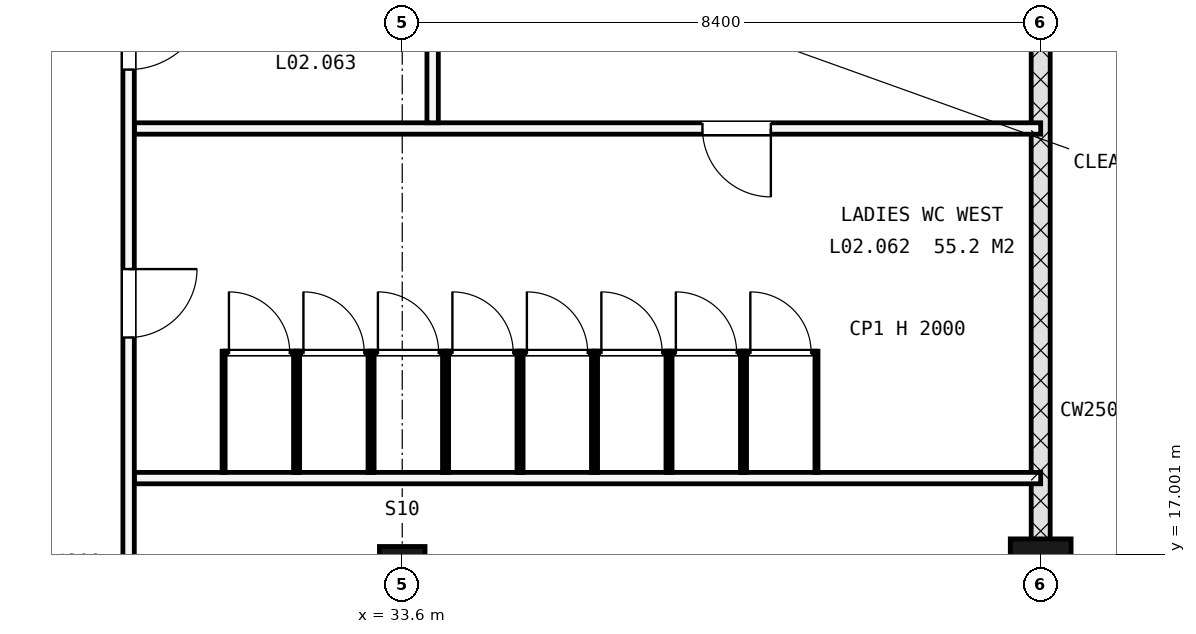
"""IFC4 building model, lengths in metres.
Left out: names, types, materials, properties, quantities, classifications, styles, units other than length and angle.
Written with IfcOpenShell. Run it as: python <this file> out.ifc"""

import sys

from ifc_helpers import new_model, si_unit, direction, frame, frame_2d, origin, origin_2d, place, context, subcontext, project, spatial, rectangle, extrude, element, fill, save


model = new_model("IFC4")
c1 = context("Model", 3, precision=1e-05, world=origin(), true_north=direction((0.0, 1.0)))
c2 = subcontext(c1, "Body", "Model", "MODEL_VIEW")
j1 = project(units=[si_unit("LENGTHUNIT", "METRE"), si_unit("PLANEANGLEUNIT", "RADIAN")], contexts=[c1])
p1 = place(None, origin())
s1 = spatial("IfcSite", under=j1, at=p1, CompositionType="ELEMENT")
p2 = place(p1, origin())
s2 = spatial("IfcBuilding", under=s1, at=p2, CompositionType="ELEMENT")
p3 = place(p2, frame((0.0, 0.0, 9.9)))
s3 = spatial("IfcBuildingStorey", under=s2, at=p3, CompositionType="ELEMENT", Elevation=9.9)
p4 = place(p3, frame((33.6, 16.8, -0.25), z_axis=(0.0, 0.0, 1.0), x_axis=(1.0, 0.0, 0.0)))
e1 = element("IfcColumn", 1, at=p4, inside=s3, PredefinedType="COLUMN", context=c2, shape_type="SweptSolid", body=[
    extrude(rectangle(XDim=0.6, YDim=0.6, at=origin_2d()), origin(), (0.0, 0.0, 1.0), 4.45),
])
p5 = place(p3, frame((42.0, 16.8, -0.25), z_axis=(0.0, 0.0, 1.0), x_axis=(1.0, 0.0, 0.0)))
e2 = element("IfcColumn", 2, at=p5, inside=s3, PredefinedType="COLUMN", context=c2, shape_type="SweptSolid", body=[
    extrude(rectangle(XDim=0.8, YDim=0.8, at=origin_2d()), origin(), (0.0, 0.0, 1.0), 4.45),
])
p6 = place(p3, frame((42.0, 12.675, -0.3), z_axis=(0.0, 0.0, 1.0), x_axis=(0.0, 1.0, 0.0)))
e3 = element("IfcWall", 3, at=p6, inside=s3, PredefinedType="SOLIDWALL", context=c2, shape_type="SweptSolid", body=[
    extrude(rectangle(XDim=12.425, YDim=0.25, at=frame_2d((6.212, 0.0))), origin(), (0.0, 0.0, 1.0), 4.5),
])
p7 = place(p3, frame((30.075, 18.0, 0.0), z_axis=(0.0, 0.0, 1.0), x_axis=(1.0, 0.0, 0.0)))
e4 = element("IfcWall", 4, at=p7, inside=s3, PredefinedType="PARTITIONING", context=c2, shape_type="SweptSolid", body=[
    extrude(rectangle(XDim=11.925, YDim=0.15, at=frame_2d((5.962, 0.0))), origin(), (0.0, 0.0, 1.0), 4.2),
])
p8 = place(p3, frame((30.075, 22.6, 0.0), z_axis=(0.0, 0.0, 1.0), x_axis=(1.0, 0.0, 0.0)))
e5 = element("IfcWall", 5, at=p8, inside=s3, PredefinedType="PARTITIONING", context=c2, shape_type="SweptSolid", body=[
    extrude(rectangle(XDim=11.925, YDim=0.15, at=frame_2d((5.962, 0.0))), origin(), (0.0, 0.0, 1.0), 4.2),
])
p9 = place(p8, frame((7.475, 0.0, 0.0)))
e6 = element("IfcOpeningElement", 6, at=p9, cuts=e5, PredefinedType="OPENING", context=c2, shape_type="SweptSolid", body=[
    extrude(rectangle(XDim=0.9, YDim=2.1, at=frame_2d((0.45, 1.05))), frame((0.0, 0.085, 0.0), z_axis=(0.0, -1.0, 0.0), x_axis=(1.0, 0.0, 0.0)), (0.0, 0.0, 1.0), 0.17),
])
p10 = place(p3, frame((30.0, 13.275, 0.0), z_axis=(0.0, 0.0, 1.0), x_axis=(0.0, 1.0, 0.0)))
e7 = element("IfcWall", 7, at=p10, inside=s3, PredefinedType="PARTITIONING", context=c2, shape_type="SweptSolid", body=[
    extrude(rectangle(XDim=11.825, YDim=0.15, at=frame_2d((5.913, 0.0))), origin(), (0.0, 0.0, 1.0), 4.2),
])
p11 = place(p10, frame((1.875, 0.0, 0.0)))
e8 = element("IfcOpeningElement", 8, at=p11, cuts=e7, PredefinedType="OPENING", context=c2, shape_type="SweptSolid", body=[
    extrude(rectangle(XDim=0.9, YDim=2.1, at=frame_2d((0.45, 1.05))), frame((0.0, 0.085, 0.0), z_axis=(0.0, -1.0, 0.0), x_axis=(1.0, 0.0, 0.0)), (0.0, 0.0, 1.0), 0.17),
])
p12 = place(p10, frame((6.575, 0.0, 0.0)))
e9 = element("IfcOpeningElement", 9, at=p12, cuts=e7, PredefinedType="OPENING", context=c2, shape_type="SweptSolid", body=[
    extrude(rectangle(XDim=0.9, YDim=2.1, at=frame_2d((0.45, 1.05))), frame((0.0, 0.085, 0.0), z_axis=(0.0, -1.0, 0.0), x_axis=(1.0, 0.0, 0.0)), (0.0, 0.0, 1.0), 0.17),
])
p13 = place(p10, frame((10.1, 0.0, 0.0)))
e10 = element("IfcOpeningElement", 10, at=p13, cuts=e7, PredefinedType="OPENING", context=c2, shape_type="SweptSolid", body=[
    extrude(rectangle(XDim=1.05, YDim=2.25, at=frame_2d((0.525, 1.125))), frame((0.0, 0.085, 0.0), z_axis=(0.0, -1.0, 0.0), x_axis=(1.0, 0.0, 0.0)), (0.0, 0.0, 1.0), 0.17),
])
p14 = place(p3, frame((34.0, 22.675, 0.0), z_axis=(0.0, 0.0, 1.0), x_axis=(0.0, 1.0, 0.0)))
e11 = element("IfcWall", 11, at=p14, inside=s3, PredefinedType="PARTITIONING", context=c2, shape_type="SweptSolid", body=[
    extrude(rectangle(XDim=2.425, YDim=0.15, at=frame_2d((1.212, 0.0))), origin(), (0.0, 0.0, 1.0), 4.2),
])
for number, where, z_axis, x_axis in (
    (12, (31.25, 18.075, 0.0), (0.0, 0.0, 1.0), (0.0, 1.0, 0.0)),
    (13, (32.19, 18.075, 0.0), (0.0, 0.0, 1.0), (0.0, 1.0, 0.0)),
):
    element("IfcWall", number, at=place(p3, frame(where, z_axis=z_axis, x_axis=x_axis)), inside=s3, PredefinedType="PARTITIONING", context=c2, shape_type="SweptSolid", body=[
        extrude(rectangle(XDim=1.595, YDim=0.04, at=frame_2d((0.797, 0.0))), origin(), (0.0, 0.0, 1.0), 2.0),
    ])
p15 = place(p3, frame((31.27, 19.65, 0.0), z_axis=(0.0, 0.0, 1.0), x_axis=(1.0, 0.0, 0.0)))
e14 = element("IfcWall", 14, at=p15, inside=s3, PredefinedType="PARTITIONING", context=c2, shape_type="SweptSolid", body=[
    extrude(rectangle(XDim=0.9, YDim=0.04, at=frame_2d((0.45, 0.0))), origin(), (0.0, 0.0, 1.0), 2.0),
])
p16 = place(p15, frame((0.05, 0.0, 0.0)))
e15 = element("IfcOpeningElement", 15, at=p16, cuts=e14, PredefinedType="OPENING", context=c2, shape_type="SweptSolid", body=[
    extrude(rectangle(XDim=0.8, YDim=2.0, at=frame_2d((0.4, 1.0))), frame((0.0, 0.03, 0.0), z_axis=(0.0, -1.0, 0.0), x_axis=(1.0, 0.0, 0.0)), (0.0, 0.0, 1.0), 0.06),
])
for number, where, z_axis, x_axis in (
    (16, (32.23, 18.075, 0.0), (0.0, 0.0, 1.0), (0.0, 1.0, 0.0)),
    (17, (33.17, 18.075, 0.0), (0.0, 0.0, 1.0), (0.0, 1.0, 0.0)),
):
    element("IfcWall", number, at=place(p3, frame(where, z_axis=z_axis, x_axis=x_axis)), inside=s3, PredefinedType="PARTITIONING", context=c2, shape_type="SweptSolid", body=[
        extrude(rectangle(XDim=1.595, YDim=0.04, at=frame_2d((0.797, 0.0))), origin(), (0.0, 0.0, 1.0), 2.0),
    ])
p17 = place(p3, frame((32.25, 19.65, 0.0), z_axis=(0.0, 0.0, 1.0), x_axis=(1.0, 0.0, 0.0)))
e18 = element("IfcWall", 18, at=p17, inside=s3, PredefinedType="PARTITIONING", context=c2, shape_type="SweptSolid", body=[
    extrude(rectangle(XDim=0.9, YDim=0.04, at=frame_2d((0.45, 0.0))), origin(), (0.0, 0.0, 1.0), 2.0),
])
p18 = place(p17, frame((0.05, 0.0, 0.0)))
e19 = element("IfcOpeningElement", 19, at=p18, cuts=e18, PredefinedType="OPENING", context=c2, shape_type="SweptSolid", body=[
    extrude(rectangle(XDim=0.8, YDim=2.0, at=frame_2d((0.4, 1.0))), frame((0.0, 0.03, 0.0), z_axis=(0.0, -1.0, 0.0), x_axis=(1.0, 0.0, 0.0)), (0.0, 0.0, 1.0), 0.06),
])
for number, where, z_axis, x_axis in (
    (20, (33.21, 18.075, 0.0), (0.0, 0.0, 1.0), (0.0, 1.0, 0.0)),
    (21, (34.15, 18.075, 0.0), (0.0, 0.0, 1.0), (0.0, 1.0, 0.0)),
):
    element("IfcWall", number, at=place(p3, frame(where, z_axis=z_axis, x_axis=x_axis)), inside=s3, PredefinedType="PARTITIONING", context=c2, shape_type="SweptSolid", body=[
        extrude(rectangle(XDim=1.595, YDim=0.04, at=frame_2d((0.797, 0.0))), origin(), (0.0, 0.0, 1.0), 2.0),
    ])
p19 = place(p3, frame((33.23, 19.65, 0.0), z_axis=(0.0, 0.0, 1.0), x_axis=(1.0, 0.0, 0.0)))
e22 = element("IfcWall", 22, at=p19, inside=s3, PredefinedType="PARTITIONING", context=c2, shape_type="SweptSolid", body=[
    extrude(rectangle(XDim=0.9, YDim=0.04, at=frame_2d((0.45, 0.0))), origin(), (0.0, 0.0, 1.0), 2.0),
])
p20 = place(p19, frame((0.05, 0.0, 0.0)))
e23 = element("IfcOpeningElement", 23, at=p20, cuts=e22, PredefinedType="OPENING", context=c2, shape_type="SweptSolid", body=[
    extrude(rectangle(XDim=0.8, YDim=2.0, at=frame_2d((0.4, 1.0))), frame((0.0, 0.03, 0.0), z_axis=(0.0, -1.0, 0.0), x_axis=(1.0, 0.0, 0.0)), (0.0, 0.0, 1.0), 0.06),
])
for number, where, z_axis, x_axis in (
    (24, (34.19, 18.075, 0.0), (0.0, 0.0, 1.0), (0.0, 1.0, 0.0)),
    (25, (35.13, 18.075, 0.0), (0.0, 0.0, 1.0), (0.0, 1.0, 0.0)),
):
    element("IfcWall", number, at=place(p3, frame(where, z_axis=z_axis, x_axis=x_axis)), inside=s3, PredefinedType="PARTITIONING", context=c2, shape_type="SweptSolid", body=[
        extrude(rectangle(XDim=1.595, YDim=0.04, at=frame_2d((0.797, 0.0))), origin(), (0.0, 0.0, 1.0), 2.0),
    ])
p21 = place(p3, frame((34.21, 19.65, 0.0), z_axis=(0.0, 0.0, 1.0), x_axis=(1.0, 0.0, 0.0)))
e26 = element("IfcWall", 26, at=p21, inside=s3, PredefinedType="PARTITIONING", context=c2, shape_type="SweptSolid", body=[
    extrude(rectangle(XDim=0.9, YDim=0.04, at=frame_2d((0.45, 0.0))), origin(), (0.0, 0.0, 1.0), 2.0),
])
p22 = place(p21, frame((0.05, 0.0, 0.0)))
e27 = element("IfcOpeningElement", 27, at=p22, cuts=e26, PredefinedType="OPENING", context=c2, shape_type="SweptSolid", body=[
    extrude(rectangle(XDim=0.8, YDim=2.0, at=frame_2d((0.4, 1.0))), frame((0.0, 0.03, 0.0), z_axis=(0.0, -1.0, 0.0), x_axis=(1.0, 0.0, 0.0)), (0.0, 0.0, 1.0), 0.06),
])
for number, where, z_axis, x_axis in (
    (28, (35.17, 18.075, 0.0), (0.0, 0.0, 1.0), (0.0, 1.0, 0.0)),
    (29, (36.11, 18.075, 0.0), (0.0, 0.0, 1.0), (0.0, 1.0, 0.0)),
):
    element("IfcWall", number, at=place(p3, frame(where, z_axis=z_axis, x_axis=x_axis)), inside=s3, PredefinedType="PARTITIONING", context=c2, shape_type="SweptSolid", body=[
        extrude(rectangle(XDim=1.595, YDim=0.04, at=frame_2d((0.797, 0.0))), origin(), (0.0, 0.0, 1.0), 2.0),
    ])
p23 = place(p3, frame((35.19, 19.65, 0.0), z_axis=(0.0, 0.0, 1.0), x_axis=(1.0, 0.0, 0.0)))
e30 = element("IfcWall", 30, at=p23, inside=s3, PredefinedType="PARTITIONING", context=c2, shape_type="SweptSolid", body=[
    extrude(rectangle(XDim=0.9, YDim=0.04, at=frame_2d((0.45, 0.0))), origin(), (0.0, 0.0, 1.0), 2.0),
])
p24 = place(p23, frame((0.05, 0.0, 0.0)))
e31 = element("IfcOpeningElement", 31, at=p24, cuts=e30, PredefinedType="OPENING", context=c2, shape_type="SweptSolid", body=[
    extrude(rectangle(XDim=0.8, YDim=2.0, at=frame_2d((0.4, 1.0))), frame((0.0, 0.03, 0.0), z_axis=(0.0, -1.0, 0.0), x_axis=(1.0, 0.0, 0.0)), (0.0, 0.0, 1.0), 0.06),
])
for number, where, z_axis, x_axis in (
    (32, (36.15, 18.075, 0.0), (0.0, 0.0, 1.0), (0.0, 1.0, 0.0)),
    (33, (37.09, 18.075, 0.0), (0.0, 0.0, 1.0), (0.0, 1.0, 0.0)),
):
    element("IfcWall", number, at=place(p3, frame(where, z_axis=z_axis, x_axis=x_axis)), inside=s3, PredefinedType="PARTITIONING", context=c2, shape_type="SweptSolid", body=[
        extrude(rectangle(XDim=1.595, YDim=0.04, at=frame_2d((0.797, 0.0))), origin(), (0.0, 0.0, 1.0), 2.0),
    ])
p25 = place(p3, frame((36.17, 19.65, 0.0), z_axis=(0.0, 0.0, 1.0), x_axis=(1.0, 0.0, 0.0)))
e34 = element("IfcWall", 34, at=p25, inside=s3, PredefinedType="PARTITIONING", context=c2, shape_type="SweptSolid", body=[
    extrude(rectangle(XDim=0.9, YDim=0.04, at=frame_2d((0.45, 0.0))), origin(), (0.0, 0.0, 1.0), 2.0),
])
p26 = place(p25, frame((0.05, 0.0, 0.0)))
e35 = element("IfcOpeningElement", 35, at=p26, cuts=e34, PredefinedType="OPENING", context=c2, shape_type="SweptSolid", body=[
    extrude(rectangle(XDim=0.8, YDim=2.0, at=frame_2d((0.4, 1.0))), frame((0.0, 0.03, 0.0), z_axis=(0.0, -1.0, 0.0), x_axis=(1.0, 0.0, 0.0)), (0.0, 0.0, 1.0), 0.06),
])
for number, where, z_axis, x_axis in (
    (36, (37.13, 18.075, 0.0), (0.0, 0.0, 1.0), (0.0, 1.0, 0.0)),
    (37, (38.07, 18.075, 0.0), (0.0, 0.0, 1.0), (0.0, 1.0, 0.0)),
):
    element("IfcWall", number, at=place(p3, frame(where, z_axis=z_axis, x_axis=x_axis)), inside=s3, PredefinedType="PARTITIONING", context=c2, shape_type="SweptSolid", body=[
        extrude(rectangle(XDim=1.595, YDim=0.04, at=frame_2d((0.797, 0.0))), origin(), (0.0, 0.0, 1.0), 2.0),
    ])
p27 = place(p3, frame((37.15, 19.65, 0.0), z_axis=(0.0, 0.0, 1.0), x_axis=(1.0, 0.0, 0.0)))
e38 = element("IfcWall", 38, at=p27, inside=s3, PredefinedType="PARTITIONING", context=c2, shape_type="SweptSolid", body=[
    extrude(rectangle(XDim=0.9, YDim=0.04, at=frame_2d((0.45, 0.0))), origin(), (0.0, 0.0, 1.0), 2.0),
])
p28 = place(p27, frame((0.05, 0.0, 0.0)))
e39 = element("IfcOpeningElement", 39, at=p28, cuts=e38, PredefinedType="OPENING", context=c2, shape_type="SweptSolid", body=[
    extrude(rectangle(XDim=0.8, YDim=2.0, at=frame_2d((0.4, 1.0))), frame((0.0, 0.03, 0.0), z_axis=(0.0, -1.0, 0.0), x_axis=(1.0, 0.0, 0.0)), (0.0, 0.0, 1.0), 0.06),
])
for number, where, z_axis, x_axis in (
    (40, (38.11, 18.075, 0.0), (0.0, 0.0, 1.0), (0.0, 1.0, 0.0)),
    (41, (39.05, 18.075, 0.0), (0.0, 0.0, 1.0), (0.0, 1.0, 0.0)),
):
    element("IfcWall", number, at=place(p3, frame(where, z_axis=z_axis, x_axis=x_axis)), inside=s3, PredefinedType="PARTITIONING", context=c2, shape_type="SweptSolid", body=[
        extrude(rectangle(XDim=1.595, YDim=0.04, at=frame_2d((0.797, 0.0))), origin(), (0.0, 0.0, 1.0), 2.0),
    ])
p29 = place(p3, frame((38.13, 19.65, 0.0), z_axis=(0.0, 0.0, 1.0), x_axis=(1.0, 0.0, 0.0)))
e42 = element("IfcWall", 42, at=p29, inside=s3, PredefinedType="PARTITIONING", context=c2, shape_type="SweptSolid", body=[
    extrude(rectangle(XDim=0.9, YDim=0.04, at=frame_2d((0.45, 0.0))), origin(), (0.0, 0.0, 1.0), 2.0),
])
p30 = place(p29, frame((0.05, 0.0, 0.0)))
e43 = element("IfcOpeningElement", 43, at=p30, cuts=e42, PredefinedType="OPENING", context=c2, shape_type="SweptSolid", body=[
    extrude(rectangle(XDim=0.8, YDim=2.0, at=frame_2d((0.4, 1.0))), frame((0.0, 0.03, 0.0), z_axis=(0.0, -1.0, 0.0), x_axis=(1.0, 0.0, 0.0)), (0.0, 0.0, 1.0), 0.06),
])
p31 = place(p12, origin())
e44 = element("IfcDoor", 44, at=p31, inside=s3, OperationType="SINGLE_SWING_RIGHT", PredefinedType="DOOR", context=c2, shape_type="SweptSolid", body=[
    extrude(rectangle(XDim=0.9, YDim=2.1, at=frame_2d((0.45, 1.05))), frame((0.0, 0.025, 0.0), z_axis=(0.0, -1.0, 0.0), x_axis=(1.0, 0.0, 0.0)), (0.0, 0.0, 1.0), 0.05),
])
fill(e9, e44)
p32 = place(p13, origin())
e45 = element("IfcDoor", 45, at=p32, inside=s3, OperationType="SINGLE_SWING_RIGHT", PredefinedType="DOOR", context=c2, shape_type="SweptSolid", body=[
    extrude(rectangle(XDim=1.05, YDim=2.25, at=frame_2d((0.525, 1.125))), frame((0.0, 0.025, 0.0), z_axis=(0.0, -1.0, 0.0), x_axis=(1.0, 0.0, 0.0)), (0.0, 0.0, 1.0), 0.05),
])
fill(e10, e45)
p33 = place(p9, origin())
e46 = element("IfcDoor", 46, at=p33, inside=s3, OperationType="SINGLE_SWING_RIGHT", PredefinedType="DOOR", context=c2, shape_type="SweptSolid", body=[
    extrude(rectangle(XDim=0.9, YDim=2.1, at=frame_2d((0.45, 1.05))), frame((0.0, 0.025, 0.0), z_axis=(0.0, -1.0, 0.0), x_axis=(1.0, 0.0, 0.0)), (0.0, 0.0, 1.0), 0.05),
])
fill(e6, e46)
p34 = place(p16, origin())
e47 = element("IfcDoor", 47, at=p34, inside=s3, OperationType="SINGLE_SWING_LEFT", PredefinedType="DOOR", context=c2, shape_type="SweptSolid", body=[
    extrude(rectangle(XDim=0.8, YDim=2.0, at=frame_2d((0.4, 1.0))), frame((0.0, 0.02, 0.0), z_axis=(0.0, -1.0, 0.0), x_axis=(1.0, 0.0, 0.0)), (0.0, 0.0, 1.0), 0.04),
])
fill(e15, e47)
p35 = place(p18, origin())
e48 = element("IfcDoor", 48, at=p35, inside=s3, OperationType="SINGLE_SWING_LEFT", PredefinedType="DOOR", context=c2, shape_type="SweptSolid", body=[
    extrude(rectangle(XDim=0.8, YDim=2.0, at=frame_2d((0.4, 1.0))), frame((0.0, 0.02, 0.0), z_axis=(0.0, -1.0, 0.0), x_axis=(1.0, 0.0, 0.0)), (0.0, 0.0, 1.0), 0.04),
])
fill(e19, e48)
p36 = place(p20, origin())
e49 = element("IfcDoor", 49, at=p36, inside=s3, OperationType="SINGLE_SWING_LEFT", PredefinedType="DOOR", context=c2, shape_type="SweptSolid", body=[
    extrude(rectangle(XDim=0.8, YDim=2.0, at=frame_2d((0.4, 1.0))), frame((0.0, 0.02, 0.0), z_axis=(0.0, -1.0, 0.0), x_axis=(1.0, 0.0, 0.0)), (0.0, 0.0, 1.0), 0.04),
])
fill(e23, e49)
p37 = place(p22, origin())
e50 = element("IfcDoor", 50, at=p37, inside=s3, OperationType="SINGLE_SWING_LEFT", PredefinedType="DOOR", context=c2, shape_type="SweptSolid", body=[
    extrude(rectangle(XDim=0.8, YDim=2.0, at=frame_2d((0.4, 1.0))), frame((0.0, 0.02, 0.0), z_axis=(0.0, -1.0, 0.0), x_axis=(1.0, 0.0, 0.0)), (0.0, 0.0, 1.0), 0.04),
])
fill(e27, e50)
p38 = place(p24, origin())
e51 = element("IfcDoor", 51, at=p38, inside=s3, OperationType="SINGLE_SWING_LEFT", PredefinedType="DOOR", context=c2, shape_type="SweptSolid", body=[
    extrude(rectangle(XDim=0.8, YDim=2.0, at=frame_2d((0.4, 1.0))), frame((0.0, 0.02, 0.0), z_axis=(0.0, -1.0, 0.0), x_axis=(1.0, 0.0, 0.0)), (0.0, 0.0, 1.0), 0.04),
])
fill(e31, e51)
p39 = place(p26, origin())
e52 = element("IfcDoor", 52, at=p39, inside=s3, OperationType="SINGLE_SWING_LEFT", PredefinedType="DOOR", context=c2, shape_type="SweptSolid", body=[
    extrude(rectangle(XDim=0.8, YDim=2.0, at=frame_2d((0.4, 1.0))), frame((0.0, 0.02, 0.0), z_axis=(0.0, -1.0, 0.0), x_axis=(1.0, 0.0, 0.0)), (0.0, 0.0, 1.0), 0.04),
])
fill(e35, e52)
p40 = place(p28, origin())
e53 = element("IfcDoor", 53, at=p40, inside=s3, OperationType="SINGLE_SWING_LEFT", PredefinedType="DOOR", context=c2, shape_type="SweptSolid", body=[
    extrude(rectangle(XDim=0.8, YDim=2.0, at=frame_2d((0.4, 1.0))), frame((0.0, 0.02, 0.0), z_axis=(0.0, -1.0, 0.0), x_axis=(1.0, 0.0, 0.0)), (0.0, 0.0, 1.0), 0.04),
])
fill(e39, e53)
p41 = place(p30, origin())
e54 = element("IfcDoor", 54, at=p41, inside=s3, OperationType="SINGLE_SWING_LEFT", PredefinedType="DOOR", context=c2, shape_type="SweptSolid", body=[
    extrude(rectangle(XDim=0.8, YDim=2.0, at=frame_2d((0.4, 1.0))), frame((0.0, 0.02, 0.0), z_axis=(0.0, -1.0, 0.0), x_axis=(1.0, 0.0, 0.0)), (0.0, 0.0, 1.0), 0.04),
])
fill(e43, e54)
save(model, sys.argv[1])
